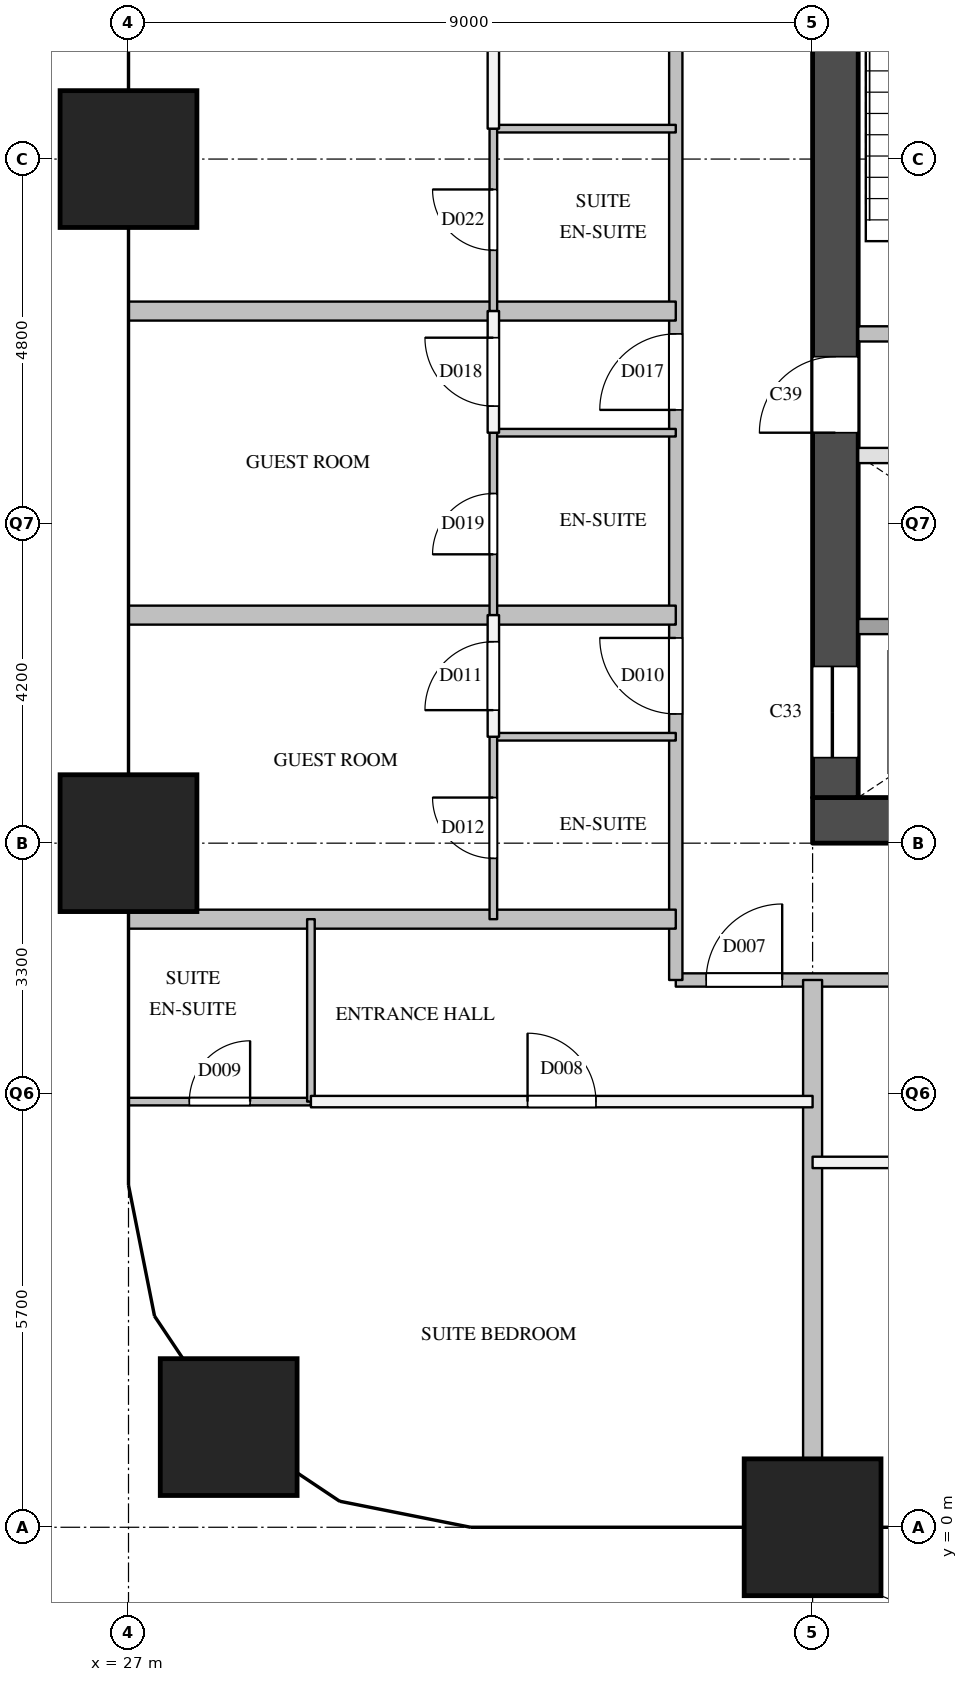
"""IFC4 building model, lengths in metres.
Left out: names, types, materials, properties, quantities, classifications, styles, units other than length and angle.
Written with IfcOpenShell. Run it as: python <this file> out.ifc"""

import sys

from ifc_helpers import new_model, si_unit, direction, frame, frame_2d, origin, origin_2d, place, context, subcontext, project, spatial, rectangle, extrude, element, fill, save


model = new_model("IFC4")
c1 = context("Model", 3, precision=1e-05, world=origin(), true_north=direction((0.0, 1.0)))
c2 = subcontext(c1, "Body", "Model", "MODEL_VIEW")
j1 = project(units=[si_unit("LENGTHUNIT", "METRE"), si_unit("PLANEANGLEUNIT", "RADIAN")], contexts=[c1])
p1 = place(None, origin())
s1 = spatial("IfcSite", under=j1, at=p1, CompositionType="ELEMENT")
p2 = place(p1, origin())
s2 = spatial("IfcBuilding", under=s1, at=p2, CompositionType="ELEMENT")
p3 = place(p2, frame((0.0, 0.0, 81.6)))
s3 = spatial("IfcBuildingStorey", under=s2, at=p3, CompositionType="ELEMENT", Elevation=81.6)
for number, where, z_axis, x_axis in (
    (1, (28.318, 1.318, 0.0), (0.0, 0.0, 1.0), (1.0, 0.0, 0.0)),
    (2, (27.0, 9.0, 0.0), (0.0, 0.0, 1.0), (1.0, 0.0, 0.0)),
    (3, (27.0, 18.0, 0.0), (0.0, 0.0, 1.0), (1.0, 0.0, 0.0)),
    (4, (36.0, 0.0, 0.0), (0.0, 0.0, 1.0), (1.0, 0.0, 0.0)),
):
    element("IfcColumn", number, at=place(p3, frame(where, z_axis=z_axis, x_axis=x_axis)), inside=s3, PredefinedType="COLUMN", context=c2, shape_type="SweptSolid", body=[
        extrude(rectangle(XDim=1.8, YDim=1.8, at=origin_2d()), origin(), (0.0, 0.0, 1.0), 3.8),
    ])
p4 = place(p3, frame((36.0, 9.3, 0.0), z_axis=(0.0, 0.0, 1.0), x_axis=(1.0, 0.0, 0.0)))
e5 = element("IfcWall", 5, at=p4, inside=s3, PredefinedType="SHEAR", context=c2, shape_type="SweptSolid", body=[
    extrude(rectangle(XDim=9.0, YDim=0.6, at=frame_2d((4.5, 0.0))), origin(), (0.0, 0.0, 1.0), 3.5),
])
p5 = place(p3, frame((36.3, 9.6, 0.0), z_axis=(0.0, 0.0, 1.0), x_axis=(0.0, 1.0, 0.0)))
e6 = element("IfcWall", 6, at=p5, inside=s3, PredefinedType="SHEAR", context=c2, shape_type="SweptSolid", body=[
    extrude(rectangle(XDim=12.3, YDim=0.6, at=frame_2d((6.15, 0.0))), origin(), (0.0, 0.0, 1.0), 3.5),
])
p6 = place(p5, frame((0.525, 0.0, 0.0)))
e7 = element("IfcOpeningElement", 7, at=p6, cuts=e6, PredefinedType="OPENING", context=c2, shape_type="SweptSolid", body=[
    extrude(rectangle(XDim=1.2, YDim=2.1, at=frame_2d((0.6, 1.05))), frame((0.0, 0.31, 0.0), z_axis=(0.0, -1.0, 0.0), x_axis=(1.0, 0.0, 0.0)), (0.0, 0.0, 1.0), 0.62),
])
p7 = place(p5, frame((4.8, 0.0, 0.0)))
e8 = element("IfcOpeningElement", 8, at=p7, cuts=e6, PredefinedType="OPENING", context=c2, shape_type="SweptSolid", body=[
    extrude(rectangle(XDim=1.0, YDim=2.1, at=frame_2d((0.5, 1.05))), frame((0.0, 0.31, 0.0), z_axis=(0.0, -1.0, 0.0), x_axis=(1.0, 0.0, 0.0)), (0.0, 0.0, 1.0), 0.62),
])
p8 = place(p3, frame((36.6, 11.85, 0.0), z_axis=(0.0, 0.0, 1.0), x_axis=(1.0, 0.0, 0.0)))
e9 = element("IfcWall", 9, at=p8, inside=s3, PredefinedType="SOLIDWALL", context=c2, shape_type="SweptSolid", body=[
    extrude(rectangle(XDim=7.8, YDim=0.2, at=frame_2d((3.9, 0.0))), origin(), (0.0, 0.0, 1.0), 3.5),
])
p9 = place(p3, frame((36.6, 14.1, 0.0), z_axis=(0.0, 0.0, 1.0), x_axis=(1.0, 0.0, 0.0)))
e10 = element("IfcWall", 10, at=p9, inside=s3, PredefinedType="PARTITIONING", context=c2, shape_type="SweptSolid", body=[
    extrude(rectangle(XDim=6.0, YDim=0.2, at=frame_2d((3.0, 0.0))), origin(), (0.0, 0.0, 1.0), 3.5),
])
p10 = place(p9, frame((2.55, 0.0, 0.0)))
e11 = element("IfcOpeningElement", 11, at=p10, cuts=e10, PredefinedType="OPENING", context=c2, shape_type="SweptSolid", body=[
    extrude(rectangle(XDim=0.9, YDim=2.1, at=frame_2d((0.45, 1.05))), frame((0.0, 0.11, 0.0), z_axis=(0.0, -1.0, 0.0), x_axis=(1.0, 0.0, 0.0)), (0.0, 0.0, 1.0), 0.22),
])
p11 = place(p3, frame((36.6, 15.7, 0.0), z_axis=(0.0, 0.0, 1.0), x_axis=(1.0, 0.0, 0.0)))
e12 = element("IfcWall", 12, at=p11, inside=s3, PredefinedType="SOLIDWALL", context=c2, shape_type="SweptSolid", body=[
    extrude(rectangle(XDim=6.3, YDim=0.2, at=frame_2d((3.15, 0.0))), origin(), (0.0, 0.0, 1.0), 3.5),
])
p12 = place(p11, frame((1.025, 0.0, 0.0)))
e13 = element("IfcOpeningElement", 13, at=p12, cuts=e12, PredefinedType="OPENING", context=c2, shape_type="SweptSolid", body=[
    extrude(rectangle(XDim=1.1, YDim=2.1, at=frame_2d((0.55, 1.05))), frame((0.0, 0.11, 0.0), z_axis=(0.0, -1.0, 0.0), x_axis=(1.0, 0.0, 0.0)), (0.0, 0.0, 1.0), 0.22),
])
p13 = place(p11, frame((4.175, 0.0, 0.0)))
e14 = element("IfcOpeningElement", 14, at=p13, cuts=e12, PredefinedType="OPENING", context=c2, shape_type="SweptSolid", body=[
    extrude(rectangle(XDim=1.1, YDim=2.1, at=frame_2d((0.55, 1.05))), frame((0.0, 0.11, 0.0), z_axis=(0.0, -1.0, 0.0), x_axis=(1.0, 0.0, 0.0)), (0.0, 0.0, 1.0), 0.22),
])
p14 = place(p3, frame((34.2, 7.2, 0.0), z_axis=(0.0, 0.0, 1.0), x_axis=(1.0, 0.0, 0.0)))
e15 = element("IfcWall", 15, at=p14, inside=s3, PredefinedType="PARTITIONING", context=c2, shape_type="SweptSolid", body=[
    extrude(rectangle(XDim=12.6, YDim=0.175, at=frame_2d((6.3, 0.0))), origin(), (0.0, 0.0, 1.0), 3.5),
])
p15 = place(p14, frame((4.1, 0.0, 0.0)))
e16 = element("IfcOpeningElement", 16, at=p15, cuts=e15, PredefinedType="OPENING", context=c2, shape_type="SweptSolid", body=[
    extrude(rectangle(XDim=1.0, YDim=2.1, at=frame_2d((0.5, 1.05))), frame((0.0, 0.097, 0.0), z_axis=(0.0, -1.0, 0.0), x_axis=(1.0, 0.0, 0.0)), (0.0, 0.0, 1.0), 0.195),
])
p16 = place(p14, frame((10.1, 0.0, 0.0)))
e17 = element("IfcOpeningElement", 17, at=p16, cuts=e15, PredefinedType="OPENING", context=c2, shape_type="SweptSolid", body=[
    extrude(rectangle(XDim=1.0, YDim=2.1, at=frame_2d((0.5, 1.05))), frame((0.0, 0.097, 0.0), z_axis=(0.0, -1.0, 0.0), x_axis=(1.0, 0.0, 0.0)), (0.0, 0.0, 1.0), 0.195),
])
p17 = place(p14, frame((0.4, 0.0, 0.0)))
e18 = element("IfcOpeningElement", 18, at=p17, cuts=e15, PredefinedType="OPENING", context=c2, shape_type="SweptSolid", body=[
    extrude(rectangle(XDim=1.0, YDim=2.1, at=frame_2d((0.5, 1.05))), frame((0.0, 0.097, 0.0), z_axis=(0.0, -1.0, 0.0), x_axis=(1.0, 0.0, 0.0)), (0.0, 0.0, 1.0), 0.195),
])
p18 = place(p3, frame((34.2, 7.2, 0.0), z_axis=(0.0, 0.0, 1.0), x_axis=(0.0, 1.0, 0.0)))
e19 = element("IfcWall", 19, at=p18, inside=s3, PredefinedType="PARTITIONING", context=c2, shape_type="SweptSolid", body=[
    extrude(rectangle(XDim=16.49, YDim=0.175, at=frame_2d((8.245, 0.0))), origin(), (0.0, 0.0, 1.0), 3.5),
])
p19 = place(p18, frame((3.5, 0.0, 0.0)))
e20 = element("IfcOpeningElement", 20, at=p19, cuts=e19, PredefinedType="OPENING", context=c2, shape_type="SweptSolid", body=[
    extrude(rectangle(XDim=1.0, YDim=2.1, at=frame_2d((0.5, 1.05))), frame((0.0, 0.097, 0.0), z_axis=(0.0, -1.0, 0.0), x_axis=(1.0, 0.0, 0.0)), (0.0, 0.0, 1.0), 0.195),
])
p20 = place(p18, frame((7.5, 0.0, 0.0)))
e21 = element("IfcOpeningElement", 21, at=p20, cuts=e19, PredefinedType="OPENING", context=c2, shape_type="SweptSolid", body=[
    extrude(rectangle(XDim=1.0, YDim=2.1, at=frame_2d((0.5, 1.05))), frame((0.0, 0.097, 0.0), z_axis=(0.0, -1.0, 0.0), x_axis=(1.0, 0.0, 0.0)), (0.0, 0.0, 1.0), 0.195),
])
p21 = place(p18, frame((13.345, 0.0, 0.0)))
e22 = element("IfcOpeningElement", 22, at=p21, cuts=e19, PredefinedType="OPENING", context=c2, shape_type="SweptSolid", body=[
    extrude(rectangle(XDim=1.0, YDim=2.1, at=frame_2d((0.5, 1.05))), frame((0.0, 0.097, 0.0), z_axis=(0.0, -1.0, 0.0), x_axis=(1.0, 0.0, 0.0)), (0.0, 0.0, 1.0), 0.195),
])
p22 = place(p3, frame((36.0, 4.8, 0.0), z_axis=(0.0, 0.0, 1.0), x_axis=(1.0, 0.0, 0.0)))
e23 = element("IfcWall", 23, at=p22, inside=s3, PredefinedType="PARTITIONING", context=c2, shape_type="SweptSolid", body=[
    extrude(rectangle(XDim=5.6, YDim=0.15, at=frame_2d((2.8, 0.0))), origin(), (0.0, 0.0, 1.0), 3.5),
])
p23 = place(p22, frame((2.35, 0.0, 0.0)))
e24 = element("IfcOpeningElement", 24, at=p23, cuts=e23, PredefinedType="OPENING", context=c2, shape_type="SweptSolid", body=[
    extrude(rectangle(XDim=0.9, YDim=2.1, at=frame_2d((0.45, 1.05))), frame((0.0, 0.085, 0.0), z_axis=(0.0, -1.0, 0.0), x_axis=(1.0, 0.0, 0.0)), (0.0, 0.0, 1.0), 0.17),
])
p24 = place(p3, frame((29.4, 5.6, 0.0), z_axis=(0.0, 0.0, 1.0), x_axis=(1.0, 0.0, 0.0)))
e25 = element("IfcWall", 25, at=p24, inside=s3, PredefinedType="PARTITIONING", context=c2, shape_type="SweptSolid", body=[
    extrude(rectangle(XDim=6.6, YDim=0.15, at=frame_2d((3.3, 0.0))), origin(), (0.0, 0.0, 1.0), 3.5),
])
p25 = place(p24, frame((2.85, 0.0, 0.0)))
e26 = element("IfcOpeningElement", 26, at=p25, cuts=e25, PredefinedType="OPENING", context=c2, shape_type="SweptSolid", body=[
    extrude(rectangle(XDim=0.9, YDim=2.1, at=frame_2d((0.45, 1.05))), frame((0.0, 0.085, 0.0), z_axis=(0.0, -1.0, 0.0), x_axis=(1.0, 0.0, 0.0)), (0.0, 0.0, 1.0), 0.17),
])
p26 = place(p3, frame((31.8, 10.4, 0.0), z_axis=(0.0, 0.0, 1.0), x_axis=(0.0, 1.0, 0.0)))
e27 = element("IfcWall", 27, at=p26, inside=s3, PredefinedType="PARTITIONING", context=c2, shape_type="SweptSolid", body=[
    extrude(rectangle(XDim=1.6, YDim=0.15, at=frame_2d((0.8, 0.0))), origin(), (0.0, 0.0, 1.0), 3.5),
])
p27 = place(p26, frame((0.35, 0.0, 0.0)))
e28 = element("IfcOpeningElement", 28, at=p27, cuts=e27, PredefinedType="OPENING", context=c2, shape_type="SweptSolid", body=[
    extrude(rectangle(XDim=0.9, YDim=2.1, at=frame_2d((0.45, 1.05))), frame((0.0, 0.085, 0.0), z_axis=(0.0, -1.0, 0.0), x_axis=(1.0, 0.0, 0.0)), (0.0, 0.0, 1.0), 0.17),
])
p28 = place(p3, frame((31.8, 14.4, 0.0), z_axis=(0.0, 0.0, 1.0), x_axis=(0.0, 1.0, 0.0)))
e29 = element("IfcWall", 29, at=p28, inside=s3, PredefinedType="PARTITIONING", context=c2, shape_type="SweptSolid", body=[
    extrude(rectangle(XDim=1.6, YDim=0.15, at=frame_2d((0.8, 0.0))), origin(), (0.0, 0.0, 1.0), 3.5),
])
p29 = place(p28, frame((0.35, 0.0, 0.0)))
e30 = element("IfcOpeningElement", 30, at=p29, cuts=e29, PredefinedType="OPENING", context=c2, shape_type="SweptSolid", body=[
    extrude(rectangle(XDim=0.9, YDim=2.1, at=frame_2d((0.45, 1.05))), frame((0.0, 0.085, 0.0), z_axis=(0.0, -1.0, 0.0), x_axis=(1.0, 0.0, 0.0)), (0.0, 0.0, 1.0), 0.17),
])
p30 = place(p3, frame((31.8, 18.4, 0.0), z_axis=(0.0, 0.0, 1.0), x_axis=(0.0, 1.0, 0.0)))
e31 = element("IfcWall", 31, at=p30, inside=s3, PredefinedType="PARTITIONING", context=c2, shape_type="SweptSolid", body=[
    extrude(rectangle(XDim=5.6, YDim=0.15, at=frame_2d((2.8, 0.0))), origin(), (0.0, 0.0, 1.0), 3.5),
])
p31 = place(p30, frame((2.35, 0.0, 0.0)))
e32 = element("IfcOpeningElement", 32, at=p31, cuts=e31, PredefinedType="OPENING", context=c2, shape_type="SweptSolid", body=[
    extrude(rectangle(XDim=0.9, YDim=2.1, at=frame_2d((0.45, 1.05))), frame((0.0, 0.085, 0.0), z_axis=(0.0, -1.0, 0.0), x_axis=(1.0, 0.0, 0.0)), (0.0, 0.0, 1.0), 0.17),
])
for number, where, z_axis, x_axis in (
    (33, (27.0, 8.0, 0.0), (0.0, 0.0, 1.0), (1.0, 0.0, 0.0)),
    (34, (27.0, 12.0, 0.0), (0.0, 0.0, 1.0), (1.0, 0.0, 0.0)),
    (35, (27.0, 16.0, 0.0), (0.0, 0.0, 1.0), (1.0, 0.0, 0.0)),
):
    element("IfcWall", number, at=place(p3, frame(where, z_axis=z_axis, x_axis=x_axis)), inside=s3, PredefinedType="PARTITIONING", context=c2, shape_type="SweptSolid", body=[
        extrude(rectangle(XDim=7.2, YDim=0.25, at=frame_2d((3.6, 0.0))), origin(), (0.0, 0.0, 1.0), 2.5),
    ])
p32 = place(p3, frame((36.0, 0.0, 0.0), z_axis=(0.0, 0.0, 1.0), x_axis=(0.0, 1.0, 0.0)))
e36 = element("IfcWall", 36, at=p32, inside=s3, PredefinedType="PARTITIONING", context=c2, shape_type="SweptSolid", body=[
    extrude(rectangle(XDim=7.2, YDim=0.25, at=frame_2d((3.6, 0.0))), origin(), (0.0, 0.0, 1.0), 3.5),
])
p33 = place(p3, frame((27.0, 5.6, 0.0), z_axis=(0.0, 0.0, 1.0), x_axis=(1.0, 0.0, 0.0)))
e37 = element("IfcWall", 37, at=p33, inside=s3, PredefinedType="PARTITIONING", context=c2, shape_type="SweptSolid", body=[
    extrude(rectangle(XDim=2.4, YDim=0.1, at=frame_2d((1.2, 0.0))), origin(), (0.0, 0.0, 1.0), 2.5),
])
p34 = place(p33, frame((0.8, 0.0, 0.0)))
e38 = element("IfcOpeningElement", 38, at=p34, cuts=e37, PredefinedType="OPENING", context=c2, shape_type="SweptSolid", body=[
    extrude(rectangle(XDim=0.8, YDim=2.1, at=frame_2d((0.4, 1.05))), frame((0.0, 0.06, 0.0), z_axis=(0.0, -1.0, 0.0), x_axis=(1.0, 0.0, 0.0)), (0.0, 0.0, 1.0), 0.12),
])
for number, where, z_axis, x_axis in (
    (39, (31.8, 10.4, 0.0), (0.0, 0.0, 1.0), (1.0, 0.0, 0.0)),
    (40, (31.8, 14.4, 0.0), (0.0, 0.0, 1.0), (1.0, 0.0, 0.0)),
    (41, (31.8, 18.4, 0.0), (0.0, 0.0, 1.0), (1.0, 0.0, 0.0)),
    (42, (29.4, 5.6, 0.0), (0.0, 0.0, 1.0), (0.0, 1.0, 0.0)),
):
    element("IfcWall", number, at=place(p3, frame(where, z_axis=z_axis, x_axis=x_axis)), inside=s3, PredefinedType="PARTITIONING", context=c2, shape_type="SweptSolid", body=[
        extrude(rectangle(XDim=2.4, YDim=0.1, at=frame_2d((1.2, 0.0))), origin(), (0.0, 0.0, 1.0), 3.5),
    ])
p35 = place(p3, frame((31.8, 8.0, 0.0), z_axis=(0.0, 0.0, 1.0), x_axis=(0.0, 1.0, 0.0)))
e43 = element("IfcWall", 43, at=p35, inside=s3, PredefinedType="PARTITIONING", context=c2, shape_type="SweptSolid", body=[
    extrude(rectangle(XDim=2.4, YDim=0.1, at=frame_2d((1.2, 0.0))), origin(), (0.0, 0.0, 1.0), 3.5),
])
p36 = place(p35, frame((0.8, 0.0, 0.0)))
e44 = element("IfcOpeningElement", 44, at=p36, cuts=e43, PredefinedType="OPENING", context=c2, shape_type="SweptSolid", body=[
    extrude(rectangle(XDim=0.8, YDim=2.1, at=frame_2d((0.4, 1.05))), frame((0.0, 0.06, 0.0), z_axis=(0.0, -1.0, 0.0), x_axis=(1.0, 0.0, 0.0)), (0.0, 0.0, 1.0), 0.12),
])
p37 = place(p3, frame((31.8, 12.0, 0.0), z_axis=(0.0, 0.0, 1.0), x_axis=(0.0, 1.0, 0.0)))
e45 = element("IfcWall", 45, at=p37, inside=s3, PredefinedType="PARTITIONING", context=c2, shape_type="SweptSolid", body=[
    extrude(rectangle(XDim=2.4, YDim=0.1, at=frame_2d((1.2, 0.0))), origin(), (0.0, 0.0, 1.0), 3.5),
])
p38 = place(p37, frame((0.8, 0.0, 0.0)))
e46 = element("IfcOpeningElement", 46, at=p38, cuts=e45, PredefinedType="OPENING", context=c2, shape_type="SweptSolid", body=[
    extrude(rectangle(XDim=0.8, YDim=2.1, at=frame_2d((0.4, 1.05))), frame((0.0, 0.06, 0.0), z_axis=(0.0, -1.0, 0.0), x_axis=(1.0, 0.0, 0.0)), (0.0, 0.0, 1.0), 0.12),
])
p39 = place(p3, frame((31.8, 16.0, 0.0), z_axis=(0.0, 0.0, 1.0), x_axis=(0.0, 1.0, 0.0)))
e47 = element("IfcWall", 47, at=p39, inside=s3, PredefinedType="PARTITIONING", context=c2, shape_type="SweptSolid", body=[
    extrude(rectangle(XDim=2.4, YDim=0.1, at=frame_2d((1.2, 0.0))), origin(), (0.0, 0.0, 1.0), 3.5),
])
p40 = place(p39, frame((0.8, 0.0, 0.0)))
e48 = element("IfcOpeningElement", 48, at=p40, cuts=e47, PredefinedType="OPENING", context=c2, shape_type="SweptSolid", body=[
    extrude(rectangle(XDim=0.8, YDim=2.1, at=frame_2d((0.4, 1.05))), frame((0.0, 0.06, 0.0), z_axis=(0.0, -1.0, 0.0), x_axis=(1.0, 0.0, 0.0)), (0.0, 0.0, 1.0), 0.12),
])
p41 = place(p6, origin())
e49 = element("IfcDoor", 49, at=p41, inside=s3, OperationType="SLIDING_TO_LEFT", PredefinedType="DOOR", context=c2, shape_type="SweptSolid", body=[
    extrude(rectangle(XDim=1.2, YDim=2.1, at=frame_2d((0.6, 1.05))), frame((0.0, 0.025, 0.0), z_axis=(0.0, -1.0, 0.0), x_axis=(1.0, 0.0, 0.0)), (0.0, 0.0, 1.0), 0.05),
])
fill(e7, e49)
p42 = place(p7, origin())
e50 = element("IfcDoor", 50, at=p42, inside=s3, OperationType="SINGLE_SWING_LEFT", PredefinedType="DOOR", context=c2, shape_type="SweptSolid", body=[
    extrude(rectangle(XDim=1.0, YDim=2.1, at=frame_2d((0.5, 1.05))), frame((0.0, 0.025, 0.0), z_axis=(0.0, -1.0, 0.0), x_axis=(1.0, 0.0, 0.0)), (0.0, 0.0, 1.0), 0.05),
])
fill(e8, e50)
p43 = place(p17, origin())
e51 = element("IfcDoor", 51, at=p43, inside=s3, OperationType="SINGLE_SWING_RIGHT", PredefinedType="DOOR", context=c2, shape_type="SweptSolid", body=[
    extrude(rectangle(XDim=1.0, YDim=2.1, at=frame_2d((0.5, 1.05))), frame((0.0, 0.025, 0.0), z_axis=(0.0, -1.0, 0.0), x_axis=(1.0, 0.0, 0.0)), (0.0, 0.0, 1.0), 0.05),
])
fill(e18, e51)
p44 = place(p25, origin())
e52 = element("IfcDoor", 52, at=p44, inside=s3, OperationType="SINGLE_SWING_LEFT", PredefinedType="DOOR", context=c2, shape_type="SweptSolid", body=[
    extrude(rectangle(XDim=0.9, YDim=2.1, at=frame_2d((0.45, 1.05))), frame((0.0, 0.025, 0.0), z_axis=(0.0, -1.0, 0.0), x_axis=(1.0, 0.0, 0.0)), (0.0, 0.0, 1.0), 0.05),
])
fill(e26, e52)
p45 = place(p34, origin())
e53 = element("IfcDoor", 53, at=p45, inside=s3, OperationType="SINGLE_SWING_RIGHT", PredefinedType="DOOR", context=c2, shape_type="SweptSolid", body=[
    extrude(rectangle(XDim=0.8, YDim=2.1, at=frame_2d((0.4, 1.05))), frame((0.0, 0.025, 0.0), z_axis=(0.0, -1.0, 0.0), x_axis=(1.0, 0.0, 0.0)), (0.0, 0.0, 1.0), 0.05),
])
fill(e38, e53)
p46 = place(p19, origin())
e54 = element("IfcDoor", 54, at=p46, inside=s3, OperationType="SINGLE_SWING_RIGHT", PredefinedType="DOOR", context=c2, shape_type="SweptSolid", body=[
    extrude(rectangle(XDim=1.0, YDim=2.1, at=frame_2d((0.5, 1.05))), frame((0.0, 0.025, 0.0), z_axis=(0.0, -1.0, 0.0), x_axis=(1.0, 0.0, 0.0)), (0.0, 0.0, 1.0), 0.05),
])
fill(e20, e54)
p47 = place(p27, origin())
e55 = element("IfcDoor", 55, at=p47, inside=s3, OperationType="SINGLE_SWING_LEFT", PredefinedType="DOOR", context=c2, shape_type="SweptSolid", body=[
    extrude(rectangle(XDim=0.9, YDim=2.1, at=frame_2d((0.45, 1.05))), frame((0.0, 0.025, 0.0), z_axis=(0.0, -1.0, 0.0), x_axis=(1.0, 0.0, 0.0)), (0.0, 0.0, 1.0), 0.05),
])
fill(e28, e55)
p48 = place(p36, origin())
e56 = element("IfcDoor", 56, at=p48, inside=s3, OperationType="SINGLE_SWING_RIGHT", PredefinedType="DOOR", context=c2, shape_type="SweptSolid", body=[
    extrude(rectangle(XDim=0.8, YDim=2.1, at=frame_2d((0.4, 1.05))), frame((0.0, 0.025, 0.0), z_axis=(0.0, -1.0, 0.0), x_axis=(1.0, 0.0, 0.0)), (0.0, 0.0, 1.0), 0.05),
])
fill(e44, e56)
p49 = place(p20, origin())
e57 = element("IfcDoor", 57, at=p49, inside=s3, OperationType="SINGLE_SWING_LEFT", PredefinedType="DOOR", context=c2, shape_type="SweptSolid", body=[
    extrude(rectangle(XDim=1.0, YDim=2.1, at=frame_2d((0.5, 1.05))), frame((0.0, 0.025, 0.0), z_axis=(0.0, -1.0, 0.0), x_axis=(1.0, 0.0, 0.0)), (0.0, 0.0, 1.0), 0.05),
])
fill(e21, e57)
p50 = place(p29, origin())
e58 = element("IfcDoor", 58, at=p50, inside=s3, OperationType="SINGLE_SWING_RIGHT", PredefinedType="DOOR", context=c2, shape_type="SweptSolid", body=[
    extrude(rectangle(XDim=0.9, YDim=2.1, at=frame_2d((0.45, 1.05))), frame((0.0, 0.025, 0.0), z_axis=(0.0, -1.0, 0.0), x_axis=(1.0, 0.0, 0.0)), (0.0, 0.0, 1.0), 0.05),
])
fill(e30, e58)
p51 = place(p38, origin())
e59 = element("IfcDoor", 59, at=p51, inside=s3, OperationType="SINGLE_SWING_LEFT", PredefinedType="DOOR", context=c2, shape_type="SweptSolid", body=[
    extrude(rectangle(XDim=0.8, YDim=2.1, at=frame_2d((0.4, 1.05))), frame((0.0, 0.025, 0.0), z_axis=(0.0, -1.0, 0.0), x_axis=(1.0, 0.0, 0.0)), (0.0, 0.0, 1.0), 0.05),
])
fill(e46, e59)
p52 = place(p40, origin())
e60 = element("IfcDoor", 60, at=p52, inside=s3, OperationType="SINGLE_SWING_RIGHT", PredefinedType="DOOR", context=c2, shape_type="SweptSolid", body=[
    extrude(rectangle(XDim=0.8, YDim=2.1, at=frame_2d((0.4, 1.05))), frame((0.0, 0.025, 0.0), z_axis=(0.0, -1.0, 0.0), x_axis=(1.0, 0.0, 0.0)), (0.0, 0.0, 1.0), 0.05),
])
fill(e48, e60)
save(model, sys.argv[1])
